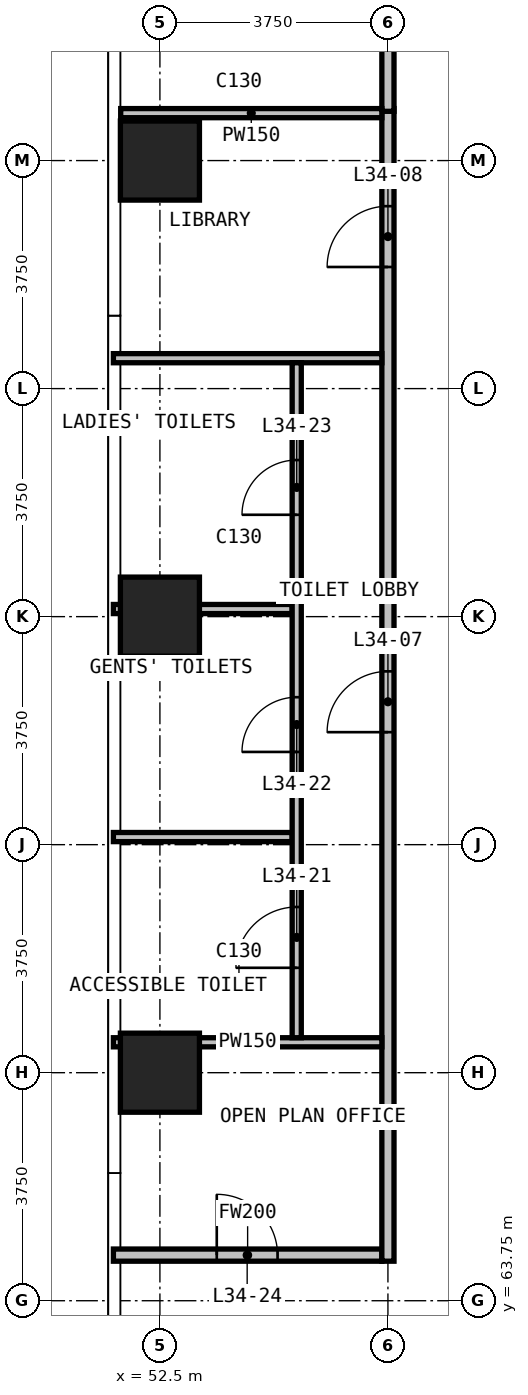
"""IFC4 building model, lengths in metres.
Left out: names, types, materials, properties, quantities, classifications, styles, units other than length and angle.
Written with IfcOpenShell. Run it as: python <this file> out.ifc"""

import sys

from ifc_helpers import new_model, si_unit, direction, frame, frame_2d, origin, origin_2d, place, context, subcontext, project, spatial, rectangle, extrude, element, fill, save


model = new_model("IFC4")
c1 = context("Model", 3, precision=1e-05, world=origin(), true_north=direction((0.0, 1.0)))
c2 = subcontext(c1, "Body", "Model", "MODEL_VIEW")
j1 = project(units=[si_unit("LENGTHUNIT", "METRE"), si_unit("PLANEANGLEUNIT", "RADIAN")], contexts=[c1])
p1 = place(None, origin())
s1 = spatial("IfcSite", under=j1, at=p1, CompositionType="ELEMENT")
p2 = place(p1, origin())
s2 = spatial("IfcBuilding", under=s1, at=p2, CompositionType="ELEMENT")
p3 = place(p2, frame((0.0, 0.0, 136.0)))
s3 = spatial("IfcBuildingStorey", under=s2, at=p3, CompositionType="ELEMENT", Elevation=136.0)
for number, where, z_axis, x_axis in (
    (1, (52.5, 67.5, 0.0), (0.0, 0.0, 1.0), (1.0, 0.0, 0.0)),
    (2, (52.5, 75.0, 0.0), (0.0, 0.0, 1.0), (1.0, 0.0, 0.0)),
    (3, (52.5, 82.5, 0.0), (0.0, 0.0, 1.0), (1.0, 0.0, 0.0)),
):
    element("IfcColumn", number, at=place(p3, frame(where, z_axis=z_axis, x_axis=x_axis)), inside=s3, PredefinedType="COLUMN", context=c2, shape_type="SweptSolid", body=[
        extrude(rectangle(XDim=1.3, YDim=1.3, at=origin_2d()), origin(), (0.0, 0.0, 1.0), 3.6),
    ])
p4 = place(p3, frame((51.735, 64.5, 0.0), z_axis=(0.0, 0.0, 1.0), x_axis=(1.0, 0.0, 0.0)))
e4 = element("IfcWall", 4, at=p4, inside=s3, PredefinedType="PARTITIONING", context=c2, shape_type="SweptSolid", body=[
    extrude(rectangle(XDim=4.415, YDim=0.2, at=frame_2d((2.208, 0.0))), origin(), (0.0, 0.0, 1.0), 3.3),
])
p5 = place(p4, frame((1.7, 0.0, 0.0)))
e5 = element("IfcOpeningElement", 5, at=p5, cuts=e4, PredefinedType="OPENING", context=c2, shape_type="SweptSolid", body=[
    extrude(rectangle(XDim=1.0, YDim=2.2, at=frame_2d((0.5, 1.1))), frame((0.0, 0.11, 0.0), z_axis=(0.0, -1.0, 0.0), x_axis=(1.0, 0.0, 0.0)), (0.0, 0.0, 1.0), 0.22),
])
p6 = place(p3, frame((56.25, 64.4, 0.0), z_axis=(0.0, 0.0, 1.0), x_axis=(0.0, 1.0, 0.0)))
e6 = element("IfcWall", 6, at=p6, inside=s3, PredefinedType="PARTITIONING", context=c2, shape_type="SweptSolid", body=[
    extrude(rectangle(XDim=18.955, YDim=0.2, at=frame_2d((9.478, 0.0))), origin(), (0.0, 0.0, 1.0), 3.3),
])
p7 = place(p6, frame((8.7, 0.0, 0.0)))
e7 = element("IfcOpeningElement", 7, at=p7, cuts=e6, PredefinedType="OPENING", context=c2, shape_type="SweptSolid", body=[
    extrude(rectangle(XDim=1.0, YDim=2.2, at=frame_2d((0.5, 1.1))), frame((0.0, 0.11, 0.0), z_axis=(0.0, -1.0, 0.0), x_axis=(1.0, 0.0, 0.0)), (0.0, 0.0, 1.0), 0.22),
])
p8 = place(p6, frame((16.35, 0.0, 0.0)))
e8 = element("IfcOpeningElement", 8, at=p8, cuts=e6, PredefinedType="OPENING", context=c2, shape_type="SweptSolid", body=[
    extrude(rectangle(XDim=1.0, YDim=2.2, at=frame_2d((0.5, 1.1))), frame((0.0, 0.11, 0.0), z_axis=(0.0, -1.0, 0.0), x_axis=(1.0, 0.0, 0.0)), (0.0, 0.0, 1.0), 0.22),
])
p9 = place(p3, frame((56.25, 83.31, 0.0), z_axis=(0.0, 0.0, 1.0), x_axis=(0.0, 1.0, 0.0)))
e9 = element("IfcWall", 9, at=p9, inside=s3, PredefinedType="PARTITIONING", context=c2, shape_type="SweptSolid", body=[
    extrude(rectangle(XDim=7.335, YDim=0.2, at=frame_2d((3.667, 0.0))), origin(), (0.0, 0.0, 1.0), 3.3),
])
p10 = place(p3, frame((51.735, 68.0, 0.0), z_axis=(0.0, 0.0, 1.0), x_axis=(1.0, 0.0, 0.0)))
e10 = element("IfcWall", 10, at=p10, inside=s3, PredefinedType="PARTITIONING", context=c2, shape_type="SweptSolid", body=[
    extrude(rectangle(XDim=4.415, YDim=0.15, at=frame_2d((2.208, 0.0))), origin(), (0.0, 0.0, 1.0), 3.3),
])
for number, where, z_axis, x_axis in (
    (11, (51.735, 71.375, 0.0), (0.0, 0.0, 1.0), (1.0, 0.0, 0.0)),
    (12, (51.735, 75.125, 0.0), (0.0, 0.0, 1.0), (1.0, 0.0, 0.0)),
):
    element("IfcWall", number, at=place(p3, frame(where, z_axis=z_axis, x_axis=x_axis)), inside=s3, PredefinedType="PARTITIONING", context=c2, shape_type="SweptSolid", body=[
        extrude(rectangle(XDim=2.94, YDim=0.15, at=frame_2d((1.47, 0.0))), origin(), (0.0, 0.0, 1.0), 3.3),
    ])
p11 = place(p3, frame((51.735, 79.25, 0.0), z_axis=(0.0, 0.0, 1.0), x_axis=(1.0, 0.0, 0.0)))
e13 = element("IfcWall", 13, at=p11, inside=s3, PredefinedType="PARTITIONING", context=c2, shape_type="SweptSolid", body=[
    extrude(rectangle(XDim=4.415, YDim=0.15, at=frame_2d((2.208, 0.0))), origin(), (0.0, 0.0, 1.0), 3.3),
])
p12 = place(p3, frame((51.855, 83.28, 0.0), z_axis=(0.0, 0.0, 1.0), x_axis=(1.0, 0.0, 0.0)))
e14 = element("IfcWall", 14, at=p12, inside=s3, PredefinedType="PARTITIONING", context=c2, shape_type="SweptSolid", body=[
    extrude(rectangle(XDim=4.295, YDim=0.15, at=frame_2d((2.147, 0.0))), origin(), (0.0, 0.0, 1.0), 3.3),
])
p13 = place(p3, frame((54.75, 68.075, 0.0), z_axis=(0.0, 0.0, 1.0), x_axis=(0.0, 1.0, 0.0)))
e15 = element("IfcWall", 15, at=p13, inside=s3, PredefinedType="PARTITIONING", context=c2, shape_type="SweptSolid", body=[
    extrude(rectangle(XDim=11.1, YDim=0.15, at=frame_2d((5.55, 0.0))), origin(), (0.0, 0.0, 1.0), 3.3),
])
p14 = place(p13, frame((1.15, 0.0, 0.0)))
e16 = element("IfcOpeningElement", 16, at=p14, cuts=e15, PredefinedType="OPENING", context=c2, shape_type="SweptSolid", body=[
    extrude(rectangle(XDim=1.0, YDim=2.2, at=frame_2d((0.5, 1.1))), frame((0.0, 0.085, 0.0), z_axis=(0.0, -1.0, 0.0), x_axis=(1.0, 0.0, 0.0)), (0.0, 0.0, 1.0), 0.17),
])
p15 = place(p13, frame((4.7, 0.0, 0.0)))
e17 = element("IfcOpeningElement", 17, at=p15, cuts=e15, PredefinedType="OPENING", context=c2, shape_type="SweptSolid", body=[
    extrude(rectangle(XDim=0.9, YDim=2.2, at=frame_2d((0.45, 1.1))), frame((0.0, 0.085, 0.0), z_axis=(0.0, -1.0, 0.0), x_axis=(1.0, 0.0, 0.0)), (0.0, 0.0, 1.0), 0.17),
])
p16 = place(p13, frame((8.6, 0.0, 0.0)))
e18 = element("IfcOpeningElement", 18, at=p16, cuts=e15, PredefinedType="OPENING", context=c2, shape_type="SweptSolid", body=[
    extrude(rectangle(XDim=0.9, YDim=2.2, at=frame_2d((0.45, 1.1))), frame((0.0, 0.085, 0.0), z_axis=(0.0, -1.0, 0.0), x_axis=(1.0, 0.0, 0.0)), (0.0, 0.0, 1.0), 0.17),
])
p17 = place(p7, origin())
e19 = element("IfcDoor", 19, at=p17, inside=s3, OperationType="SINGLE_SWING_LEFT", PredefinedType="DOOR", context=c2, shape_type="SweptSolid", body=[
    extrude(rectangle(XDim=1.0, YDim=2.2, at=frame_2d((0.5, 1.1))), frame((0.0, 0.025, 0.0), z_axis=(0.0, -1.0, 0.0), x_axis=(1.0, 0.0, 0.0)), (0.0, 0.0, 1.0), 0.05),
])
fill(e7, e19)
p18 = place(p8, origin())
e20 = element("IfcDoor", 20, at=p18, inside=s3, OperationType="SINGLE_SWING_RIGHT", PredefinedType="DOOR", context=c2, shape_type="SweptSolid", body=[
    extrude(rectangle(XDim=1.0, YDim=2.2, at=frame_2d((0.5, 1.1))), frame((0.0, 0.025, 0.0), z_axis=(0.0, -1.0, 0.0), x_axis=(1.0, 0.0, 0.0)), (0.0, 0.0, 1.0), 0.05),
])
fill(e8, e20)
p19 = place(p14, origin())
e21 = element("IfcDoor", 21, at=p19, inside=s3, OperationType="SINGLE_SWING_RIGHT", PredefinedType="DOOR", context=c2, shape_type="SweptSolid", body=[
    extrude(rectangle(XDim=1.0, YDim=2.2, at=frame_2d((0.5, 1.1))), frame((0.0, 0.025, 0.0), z_axis=(0.0, -1.0, 0.0), x_axis=(1.0, 0.0, 0.0)), (0.0, 0.0, 1.0), 0.05),
])
fill(e16, e21)
p20 = place(p15, origin())
e22 = element("IfcDoor", 22, at=p20, inside=s3, OperationType="SINGLE_SWING_LEFT", PredefinedType="DOOR", context=c2, shape_type="SweptSolid", body=[
    extrude(rectangle(XDim=0.9, YDim=2.2, at=frame_2d((0.45, 1.1))), frame((0.0, 0.025, 0.0), z_axis=(0.0, -1.0, 0.0), x_axis=(1.0, 0.0, 0.0)), (0.0, 0.0, 1.0), 0.05),
])
fill(e17, e22)
p21 = place(p16, origin())
e23 = element("IfcDoor", 23, at=p21, inside=s3, OperationType="SINGLE_SWING_LEFT", PredefinedType="DOOR", context=c2, shape_type="SweptSolid", body=[
    extrude(rectangle(XDim=0.9, YDim=2.2, at=frame_2d((0.45, 1.1))), frame((0.0, 0.025, 0.0), z_axis=(0.0, -1.0, 0.0), x_axis=(1.0, 0.0, 0.0)), (0.0, 0.0, 1.0), 0.05),
])
fill(e18, e23)
p22 = place(p5, origin())
e24 = element("IfcDoor", 24, at=p22, inside=s3, OperationType="SINGLE_SWING_RIGHT", PredefinedType="DOOR", context=c2, shape_type="SweptSolid", body=[
    extrude(rectangle(XDim=1.0, YDim=2.2, at=frame_2d((0.5, 1.1))), frame((0.0, 0.025, 0.0), z_axis=(0.0, -1.0, 0.0), x_axis=(1.0, 0.0, 0.0)), (0.0, 0.0, 1.0), 0.05),
])
fill(e5, e24)
save(model, sys.argv[1])
